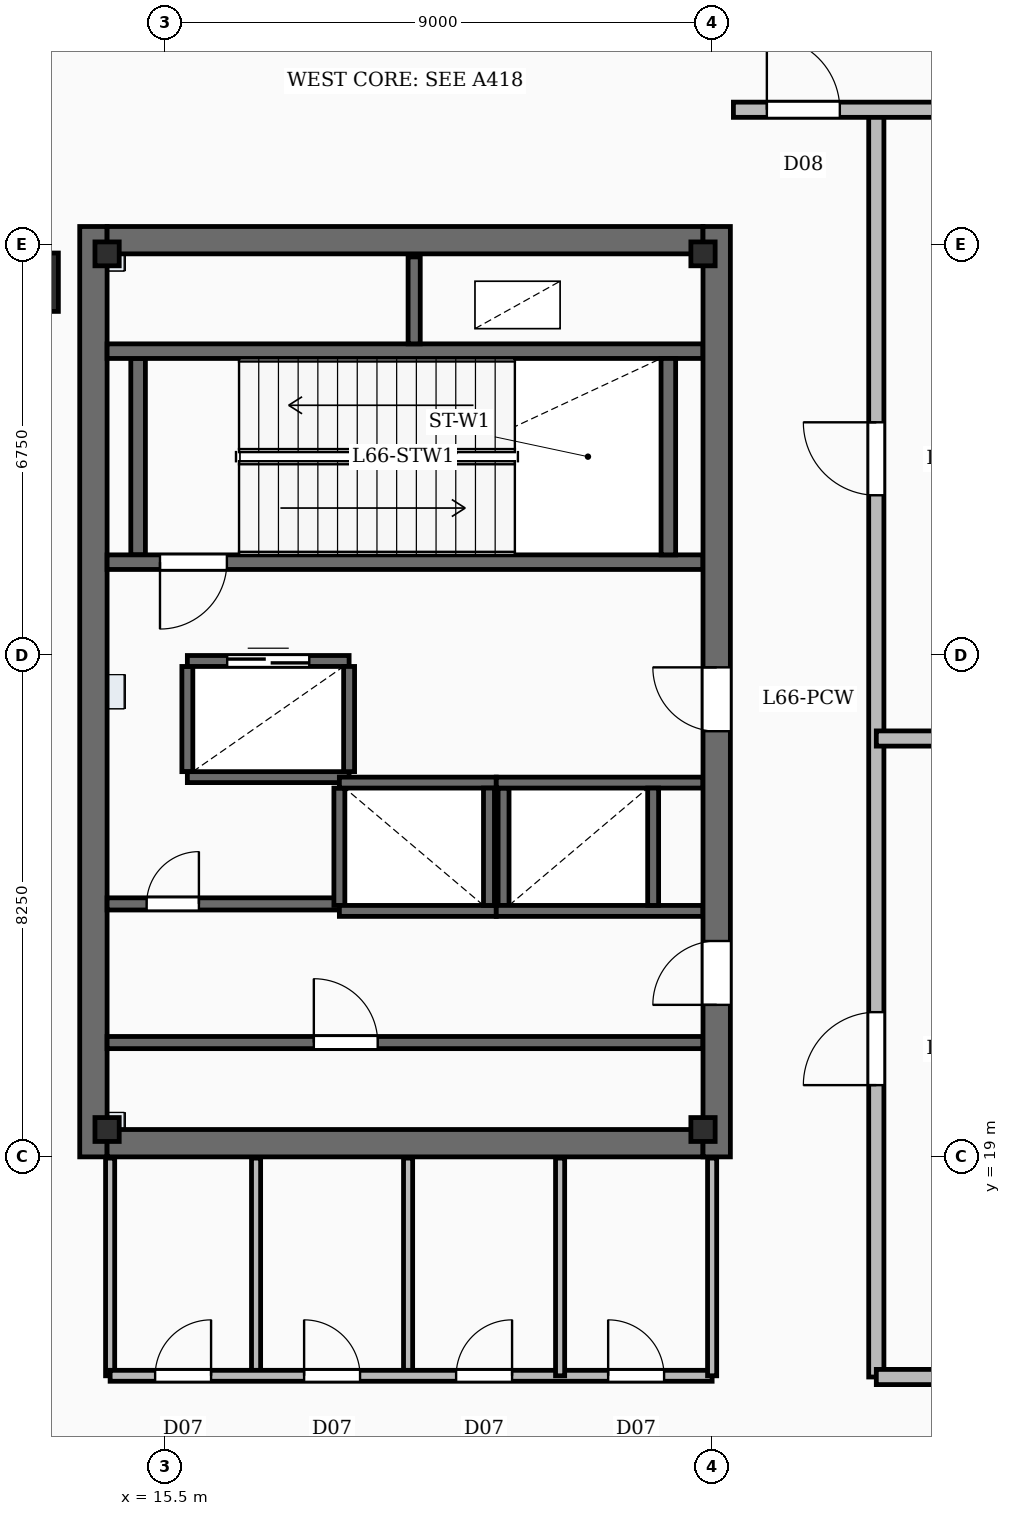
"""IFC4 building model, lengths in metres.
Left out: names, types, materials, properties, quantities, classifications, styles, units other than length and angle.
Written with IfcOpenShell. Run it as: python <this file> out.ifc"""

import sys

from ifc_helpers import new_model, si_unit, direction, frame, frame_2d, origin, origin_2d, place, context, subcontext, project, spatial, rectangle, i_section, extrude, element, fill, save


model = new_model("IFC4")
c1 = context("Model", 3, precision=1e-05, world=origin(), true_north=direction((0.0, 1.0)))
c2 = subcontext(c1, "Body", "Model", "MODEL_VIEW")
j1 = project(units=[si_unit("LENGTHUNIT", "METRE"), si_unit("PLANEANGLEUNIT", "RADIAN")], contexts=[c1])
p1 = place(None, origin())
s1 = spatial("IfcSite", under=j1, at=p1, CompositionType="ELEMENT")
p2 = place(p1, origin())
s2 = spatial("IfcBuilding", under=s1, at=p2, CompositionType="ELEMENT")
p3 = place(p2, frame((0.0, 0.0, 269.7)))
s3 = spatial("IfcBuildingStorey", under=s2, at=p3, CompositionType="ELEMENT", Elevation=269.7)
p4 = place(p3, frame((14.325, 19.0, -0.42), z_axis=(0.0, 0.0, 1.0), x_axis=(0.0, 1.0, 0.0)))
e1 = element("IfcWall", 1, at=p4, inside=s3, PredefinedType="SHEAR", context=c2, shape_type="SweptSolid", body=[
    extrude(rectangle(XDim=15.3, YDim=0.45, at=frame_2d((7.65, 0.0))), origin(), (0.0, 0.0, 1.0), 5.17),
])
p5 = place(p3, frame((24.575, 19.0, -0.42), z_axis=(0.0, 0.0, 1.0), x_axis=(0.0, 1.0, 0.0)))
e2 = element("IfcWall", 2, at=p5, inside=s3, PredefinedType="SHEAR", context=c2, shape_type="SweptSolid", body=[
    extrude(rectangle(XDim=15.3, YDim=0.45, at=frame_2d((7.65, 0.0))), origin(), (0.0, 0.0, 1.0), 5.17),
])
p6 = place(p5, frame((2.5, 0.0, 0.42)))
e3 = element("IfcOpeningElement", 3, at=p6, cuts=e2, PredefinedType="OPENING", context=c2, shape_type="SweptSolid", body=[
    extrude(rectangle(XDim=1.05, YDim=2.15, at=frame_2d((0.525, 1.075))), frame((0.0, 0.235, 0.0), z_axis=(0.0, -1.0, 0.0), x_axis=(1.0, 0.0, 0.0)), (0.0, 0.0, 1.0), 0.47),
])
p7 = place(p5, frame((7.0, 0.0, 0.42)))
e4 = element("IfcOpeningElement", 4, at=p7, cuts=e2, PredefinedType="OPENING", context=c2, shape_type="SweptSolid", body=[
    extrude(rectangle(XDim=1.05, YDim=2.15, at=frame_2d((0.525, 1.075))), frame((0.0, 0.235, 0.0), z_axis=(0.0, -1.0, 0.0), x_axis=(1.0, 0.0, 0.0)), (0.0, 0.0, 1.0), 0.47),
])
for number, where, z_axis, x_axis in (
    (5, (14.55, 19.225, -0.42), (0.0, 0.0, 1.0), (1.0, 0.0, 0.0)),
    (6, (14.55, 34.075, -0.42), (0.0, 0.0, 1.0), (1.0, 0.0, 0.0)),
):
    element("IfcWall", number, at=place(p3, frame(where, z_axis=z_axis, x_axis=x_axis)), inside=s3, PredefinedType="SHEAR", context=c2, shape_type="SweptSolid", body=[
        extrude(rectangle(XDim=9.8, YDim=0.45, at=frame_2d((4.9, 0.0))), origin(), (0.0, 0.0, 1.0), 5.17),
    ])
for number, where, z_axis, x_axis in (
    (7, (14.55, 19.45, -0.42), (0.0, 0.0, 1.0), (1.0, 0.0, 0.0)),
    (8, (24.35, 19.45, -0.42), (0.0, 0.0, 1.0), (1.0, 0.0, 0.0)),
    (9, (14.55, 33.85, -0.42), (0.0, 0.0, 1.0), (1.0, 0.0, 0.0)),
    (10, (24.35, 33.85, -0.42), (0.0, 0.0, 1.0), (1.0, 0.0, 0.0)),
):
    element("IfcColumn", number, at=place(p3, frame(where, z_axis=z_axis, x_axis=x_axis)), inside=s3, PredefinedType="COLUMN", context=c2, shape_type="SweptSolid", body=[
        extrude(i_section(OverallWidth=0.399, OverallDepth=0.393, WebThickness=0.023, FlangeThickness=0.037, FilletRadius=0.02, at=origin_2d()), origin(), (0.0, 0.0, 1.0), 5.17),
    ])
p8 = place(p3, frame((10.241, 10.697, 0.0), z_axis=(0.0, 0.0, 1.0), x_axis=(0.113196122102, 0.993572663644, 0.0)))
e11 = element("IfcWall", 11, at=p8, inside=s3, PredefinedType="SOLIDWALL", context=c2, shape_type="SweptSolid", body=[
    extrude(rectangle(XDim=34.5, YDim=0.42, at=frame_2d((17.25, 0.0))), origin(), (0.0, 0.0, 1.0), 4.75),
])
p9 = place(p3, frame((24.35, 28.78, 0.0), z_axis=(0.0, 0.0, 1.0), x_axis=(-1.0, 0.0, 0.0)))
e12 = element("IfcWall", 12, at=p9, inside=s3, PredefinedType="SOLIDWALL", context=c2, shape_type="SweptSolid", body=[
    extrude(rectangle(XDim=9.8, YDim=0.24, at=frame_2d((4.9, 0.0))), origin(), (0.0, 0.0, 1.0), 4.75),
])
p10 = place(p9, frame((7.83, 0.0, 0.0)))
e13 = element("IfcOpeningElement", 13, at=p10, cuts=e12, PredefinedType="OPENING", context=c2, shape_type="SweptSolid", body=[
    extrude(rectangle(XDim=1.1, YDim=2.15, at=frame_2d((0.55, 1.075))), frame((0.0, 0.13, 0.0), z_axis=(0.0, -1.0, 0.0), x_axis=(1.0, 0.0, 0.0)), (0.0, 0.0, 1.0), 0.26),
])
p11 = place(p3, frame((14.55, 32.25, 0.0), z_axis=(0.0, 0.0, 1.0), x_axis=(1.0, 0.0, 0.0)))
e14 = element("IfcWall", 14, at=p11, inside=s3, PredefinedType="SOLIDWALL", context=c2, shape_type="SweptSolid", body=[
    extrude(rectangle(XDim=9.8, YDim=0.24, at=frame_2d((4.9, 0.0))), origin(), (0.0, 0.0, 1.0), 4.75),
])
for number, where, z_axis, x_axis in (
    (15, (15.06, 28.9, 0.0), (0.0, 0.0, 1.0), (0.0, 1.0, 0.0)),
    (16, (23.78, 28.9, 0.0), (0.0, 0.0, 1.0), (0.0, 1.0, 0.0)),
):
    element("IfcWall", number, at=place(p3, frame(where, z_axis=z_axis, x_axis=x_axis)), inside=s3, PredefinedType="SOLIDWALL", context=c2, shape_type="SweptSolid", body=[
        extrude(rectangle(XDim=3.23, YDim=0.24, at=frame_2d((1.615, 0.0))), origin(), (0.0, 0.0, 1.0), 4.75),
    ])
p12 = place(p3, frame((19.6, 32.37, 0.0), z_axis=(0.0, 0.0, 1.0), x_axis=(0.0, 1.0, 0.0)))
e17 = element("IfcWall", 17, at=p12, inside=s3, PredefinedType="SOLIDWALL", context=c2, shape_type="SweptSolid", body=[
    extrude(rectangle(XDim=1.43, YDim=0.2, at=frame_2d((0.715, 0.0))), origin(), (0.0, 0.0, 1.0), 4.75),
])
for number, where, z_axis, x_axis in (
    (18, (18.37, 25.155, 0.0), (0.0, 0.0, 1.0), (1.0, 0.0, 0.0)),
    (19, (18.37, 23.045, 0.0), (0.0, 0.0, 1.0), (1.0, 0.0, 0.0)),
):
    element("IfcWall", number, at=place(p3, frame(where, z_axis=z_axis, x_axis=x_axis)), inside=s3, PredefinedType="SOLIDWALL", context=c2, shape_type="SweptSolid", body=[
        extrude(rectangle(XDim=2.58, YDim=0.18, at=frame_2d((1.29, 0.0))), origin(), (0.0, 0.0, 1.0), 4.75),
    ])
for number, where, z_axis, x_axis in (
    (20, (18.37, 23.135, 0.0), (0.0, 0.0, 1.0), (0.0, 1.0, 0.0)),
    (21, (20.83, 23.135, 0.0), (0.0, 0.0, 1.0), (0.0, 1.0, 0.0)),
):
    element("IfcWall", number, at=place(p3, frame(where, z_axis=z_axis, x_axis=x_axis)), inside=s3, PredefinedType="SOLIDWALL", context=c2, shape_type="SweptSolid", body=[
        extrude(rectangle(XDim=1.93, YDim=0.18, at=frame_2d((0.965, 0.0))), origin(), (0.0, 0.0, 1.0), 4.75),
    ])
for number, where, z_axis, x_axis in (
    (22, (20.95, 25.155, 0.0), (0.0, 0.0, 1.0), (1.0, 0.0, 0.0)),
    (23, (20.95, 23.045, 0.0), (0.0, 0.0, 1.0), (1.0, 0.0, 0.0)),
):
    element("IfcWall", number, at=place(p3, frame(where, z_axis=z_axis, x_axis=x_axis)), inside=s3, PredefinedType="SOLIDWALL", context=c2, shape_type="SweptSolid", body=[
        extrude(rectangle(XDim=3.4, YDim=0.18, at=frame_2d((1.7, 0.0))), origin(), (0.0, 0.0, 1.0), 4.75),
    ])
for number, where, z_axis, x_axis in (
    (24, (21.07, 23.135, 0.0), (0.0, 0.0, 1.0), (0.0, 1.0, 0.0)),
    (25, (23.53, 23.135, 0.0), (0.0, 0.0, 1.0), (0.0, 1.0, 0.0)),
):
    element("IfcWall", number, at=place(p3, frame(where, z_axis=z_axis, x_axis=x_axis)), inside=s3, PredefinedType="SOLIDWALL", context=c2, shape_type="SweptSolid", body=[
        extrude(rectangle(XDim=1.93, YDim=0.18, at=frame_2d((0.965, 0.0))), origin(), (0.0, 0.0, 1.0), 4.75),
    ])
p13 = place(p3, frame((15.87, 27.155, 0.0), z_axis=(0.0, 0.0, 1.0), x_axis=(1.0, 0.0, 0.0)))
e26 = element("IfcWall", 26, at=p13, inside=s3, PredefinedType="SOLIDWALL", context=c2, shape_type="SweptSolid", body=[
    extrude(rectangle(XDim=2.66, YDim=0.18, at=frame_2d((1.33, 0.0))), origin(), (0.0, 0.0, 1.0), 4.75),
])
p14 = place(p13, frame((0.655, 0.0, 0.0)))
e27 = element("IfcOpeningElement", 27, at=p14, cuts=e26, PredefinedType="OPENING", context=c2, shape_type="SweptSolid", body=[
    extrude(rectangle(XDim=1.35, YDim=2.3, at=frame_2d((0.675, 1.15))), frame((0.0, 0.1, 0.0), z_axis=(0.0, -1.0, 0.0), x_axis=(1.0, 0.0, 0.0)), (0.0, 0.0, 1.0), 0.2),
])
p15 = place(p3, frame((15.87, 25.245, 0.0), z_axis=(0.0, 0.0, 1.0), x_axis=(1.0, 0.0, 0.0)))
e28 = element("IfcWall", 28, at=p15, inside=s3, PredefinedType="SOLIDWALL", context=c2, shape_type="SweptSolid", body=[
    extrude(rectangle(XDim=2.66, YDim=0.18, at=frame_2d((1.33, 0.0))), origin(), (0.0, 0.0, 1.0), 4.75),
])
for number, where, z_axis, x_axis in (
    (29, (15.87, 25.335, 0.0), (0.0, 0.0, 1.0), (0.0, 1.0, 0.0)),
    (30, (18.53, 25.335, 0.0), (0.0, 0.0, 1.0), (0.0, 1.0, 0.0)),
):
    element("IfcWall", number, at=place(p3, frame(where, z_axis=z_axis, x_axis=x_axis)), inside=s3, PredefinedType="SOLIDWALL", context=c2, shape_type="SweptSolid", body=[
        extrude(rectangle(XDim=1.73, YDim=0.18, at=frame_2d((0.865, 0.0))), origin(), (0.0, 0.0, 1.0), 4.75),
    ])
p16 = place(p3, frame((14.55, 20.88, 0.0), z_axis=(0.0, 0.0, 1.0), x_axis=(1.0, 0.0, 0.0)))
e31 = element("IfcWall", 31, at=p16, inside=s3, PredefinedType="SOLIDWALL", context=c2, shape_type="SweptSolid", body=[
    extrude(rectangle(XDim=9.8, YDim=0.2, at=frame_2d((4.9, 0.0))), origin(), (0.0, 0.0, 1.0), 3.81),
])
p17 = place(p16, frame((3.4, 0.0, 0.0)))
e32 = element("IfcOpeningElement", 32, at=p17, cuts=e31, PredefinedType="OPENING", context=c2, shape_type="SweptSolid", body=[
    extrude(rectangle(XDim=1.05, YDim=2.15, at=frame_2d((0.525, 1.075))), frame((0.0, 0.11, 0.0), z_axis=(0.0, -1.0, 0.0), x_axis=(1.0, 0.0, 0.0)), (0.0, 0.0, 1.0), 0.22),
])
p18 = place(p3, frame((14.55, 23.16, 0.0), z_axis=(0.0, 0.0, 1.0), x_axis=(1.0, 0.0, 0.0)))
e33 = element("IfcWall", 33, at=p18, inside=s3, PredefinedType="SOLIDWALL", context=c2, shape_type="SweptSolid", body=[
    extrude(rectangle(XDim=3.82, YDim=0.2, at=frame_2d((1.91, 0.0))), origin(), (0.0, 0.0, 1.0), 3.81),
])
p19 = place(p18, frame((0.65, 0.0, 0.0)))
e34 = element("IfcOpeningElement", 34, at=p19, cuts=e33, PredefinedType="OPENING", context=c2, shape_type="SweptSolid", body=[
    extrude(rectangle(XDim=0.86, YDim=2.05, at=frame_2d((0.43, 1.025))), frame((0.0, 0.11, 0.0), z_axis=(0.0, -1.0, 0.0), x_axis=(1.0, 0.0, 0.0)), (0.0, 0.0, 1.0), 0.22),
])
for number, where, z_axis, x_axis in (
    (35, (17.0, 15.4, 0.0), (0.0, 0.0, 1.0), (0.0, 1.0, 0.0)),
    (36, (19.5, 15.4, 0.0), (0.0, 0.0, 1.0), (0.0, 1.0, 0.0)),
    (37, (22.0, 15.4, 0.0), (0.0, 0.0, 1.0), (0.0, 1.0, 0.0)),
):
    element("IfcWall", number, at=place(p3, frame(where, z_axis=z_axis, x_axis=x_axis)), inside=s3, PredefinedType="PARTITIONING", context=c2, shape_type="SweptSolid", body=[
        extrude(rectangle(XDim=3.58, YDim=0.15, at=frame_2d((1.79, 0.0))), origin(), (0.0, 0.0, 1.0), 3.81),
    ])
p20 = place(p3, frame((14.6, 15.4, 0.0), z_axis=(0.0, 0.0, 1.0), x_axis=(1.0, 0.0, 0.0)))
e38 = element("IfcWall", 38, at=p20, inside=s3, PredefinedType="PARTITIONING", context=c2, shape_type="SweptSolid", body=[
    extrude(rectangle(XDim=9.9, YDim=0.18, at=frame_2d((4.95, 0.0))), origin(), (0.0, 0.0, 1.0), 3.81),
])
p21 = place(p20, frame((0.74, 0.0, 0.0)))
e39 = element("IfcOpeningElement", 39, at=p21, cuts=e38, PredefinedType="OPENING", context=c2, shape_type="SweptSolid", body=[
    extrude(rectangle(XDim=0.92, YDim=2.1, at=frame_2d((0.46, 1.05))), frame((0.0, 0.1, 0.0), z_axis=(0.0, -1.0, 0.0), x_axis=(1.0, 0.0, 0.0)), (0.0, 0.0, 1.0), 0.2),
])
p22 = place(p20, frame((3.19, 0.0, 0.0)))
e40 = element("IfcOpeningElement", 40, at=p22, cuts=e38, PredefinedType="OPENING", context=c2, shape_type="SweptSolid", body=[
    extrude(rectangle(XDim=0.92, YDim=2.1, at=frame_2d((0.46, 1.05))), frame((0.0, 0.1, 0.0), z_axis=(0.0, -1.0, 0.0), x_axis=(1.0, 0.0, 0.0)), (0.0, 0.0, 1.0), 0.2),
])
p23 = place(p20, frame((5.69, 0.0, 0.0)))
e41 = element("IfcOpeningElement", 41, at=p23, cuts=e38, PredefinedType="OPENING", context=c2, shape_type="SweptSolid", body=[
    extrude(rectangle(XDim=0.92, YDim=2.1, at=frame_2d((0.46, 1.05))), frame((0.0, 0.1, 0.0), z_axis=(0.0, -1.0, 0.0), x_axis=(1.0, 0.0, 0.0)), (0.0, 0.0, 1.0), 0.2),
])
p24 = place(p20, frame((8.19, 0.0, 0.0)))
e42 = element("IfcOpeningElement", 42, at=p24, cuts=e38, PredefinedType="OPENING", context=c2, shape_type="SweptSolid", body=[
    extrude(rectangle(XDim=0.92, YDim=2.1, at=frame_2d((0.46, 1.05))), frame((0.0, 0.1, 0.0), z_axis=(0.0, -1.0, 0.0), x_axis=(1.0, 0.0, 0.0)), (0.0, 0.0, 1.0), 0.2),
])
for number, where, z_axis, x_axis in (
    (43, (14.6, 15.4, 0.0), (0.0, 0.0, 1.0), (0.0, 1.0, 0.0)),
    (44, (24.5, 15.4, 0.0), (0.0, 0.0, 1.0), (0.0, 1.0, 0.0)),
):
    element("IfcWall", number, at=place(p3, frame(where, z_axis=z_axis, x_axis=x_axis)), inside=s3, PredefinedType="PARTITIONING", context=c2, shape_type="SweptSolid", body=[
        extrude(rectangle(XDim=3.58, YDim=0.15, at=frame_2d((1.79, 0.0))), origin(), (0.0, 0.0, 1.0), 2.8),
    ])
for number, where, z_axis, x_axis in (
    (45, (27.2, 25.88, 0.0), (0.0, 0.0, 1.0), (1.0, 0.0, 0.0)),
    (46, (27.2, 15.38, 0.0), (0.0, 0.0, 1.0), (1.0, 0.0, 0.0)),
):
    element("IfcWall", number, at=place(p3, frame(where, z_axis=z_axis, x_axis=x_axis)), inside=s3, PredefinedType="SOLIDWALL", context=c2, shape_type="SweptSolid", body=[
        extrude(rectangle(XDim=20.5, YDim=0.25, at=frame_2d((10.25, 0.0))), origin(), (0.0, 0.0, 1.0), 3.81),
    ])
p25 = place(p3, frame((24.85, 36.22, 0.0), z_axis=(0.0, 0.0, 1.0), x_axis=(1.0, 0.0, 0.0)))
e47 = element("IfcWall", 47, at=p25, inside=s3, PredefinedType="SOLIDWALL", context=c2, shape_type="SweptSolid", body=[
    extrude(rectangle(XDim=25.2, YDim=0.25, at=frame_2d((12.6, 0.0))), origin(), (0.0, 0.0, 1.0), 3.81),
])
p26 = place(p25, frame((0.55, 0.0, 0.0)))
e48 = element("IfcOpeningElement", 48, at=p26, cuts=e47, PredefinedType="OPENING", context=c2, shape_type="SweptSolid", body=[
    extrude(rectangle(XDim=1.2, YDim=2.2, at=frame_2d((0.6, 1.1))), frame((0.0, 0.135, 0.0), z_axis=(0.0, -1.0, 0.0), x_axis=(1.0, 0.0, 0.0)), (0.0, 0.0, 1.0), 0.27),
])
p27 = place(p3, frame((27.2, 15.38, 0.0), z_axis=(0.0, 0.0, 1.0), x_axis=(0.0, 1.0, 0.0)))
e49 = element("IfcWall", 49, at=p27, inside=s3, PredefinedType="SOLIDWALL", context=c2, shape_type="SweptSolid", body=[
    extrude(rectangle(XDim=20.84, YDim=0.25, at=frame_2d((10.42, 0.0))), origin(), (0.0, 0.0, 1.0), 3.81),
])
p28 = place(p27, frame((4.8, 0.0, 0.0)))
e50 = element("IfcOpeningElement", 50, at=p28, cuts=e49, PredefinedType="OPENING", context=c2, shape_type="SweptSolid", body=[
    extrude(rectangle(XDim=1.2, YDim=2.2, at=frame_2d((0.6, 1.1))), frame((0.0, 0.135, 0.0), z_axis=(0.0, -1.0, 0.0), x_axis=(1.0, 0.0, 0.0)), (0.0, 0.0, 1.0), 0.27),
])
p29 = place(p27, frame((14.5, 0.0, 0.0)))
e51 = element("IfcOpeningElement", 51, at=p29, cuts=e49, PredefinedType="OPENING", context=c2, shape_type="SweptSolid", body=[
    extrude(rectangle(XDim=1.2, YDim=2.2, at=frame_2d((0.6, 1.1))), frame((0.0, 0.135, 0.0), z_axis=(0.0, -1.0, 0.0), x_axis=(1.0, 0.0, 0.0)), (0.0, 0.0, 1.0), 0.27),
])
p30 = place(p6, origin())
e52 = element("IfcDoor", 52, at=p30, inside=s3, OperationType="SINGLE_SWING_LEFT", PredefinedType="DOOR", context=c2, shape_type="SweptSolid", body=[
    extrude(rectangle(XDim=1.05, YDim=2.15, at=frame_2d((0.525, 1.075))), frame((0.0, 0.025, 0.0), z_axis=(0.0, -1.0, 0.0), x_axis=(1.0, 0.0, 0.0)), (0.0, 0.0, 1.0), 0.05),
])
fill(e3, e52)
p31 = place(p7, origin())
e53 = element("IfcDoor", 53, at=p31, inside=s3, OperationType="SINGLE_SWING_RIGHT", PredefinedType="DOOR", context=c2, shape_type="SweptSolid", body=[
    extrude(rectangle(XDim=1.05, YDim=2.15, at=frame_2d((0.525, 1.075))), frame((0.0, 0.025, 0.0), z_axis=(0.0, -1.0, 0.0), x_axis=(1.0, 0.0, 0.0)), (0.0, 0.0, 1.0), 0.05),
])
fill(e4, e53)
p32 = place(p10, origin())
e54 = element("IfcDoor", 54, at=p32, inside=s3, OperationType="SINGLE_SWING_RIGHT", PredefinedType="DOOR", context=c2, shape_type="SweptSolid", body=[
    extrude(rectangle(XDim=1.1, YDim=2.15, at=frame_2d((0.55, 1.075))), frame((0.0, 0.025, 0.0), z_axis=(0.0, -1.0, 0.0), x_axis=(1.0, 0.0, 0.0)), (0.0, 0.0, 1.0), 0.05),
])
fill(e13, e54)
p33 = place(p14, origin())
e55 = element("IfcDoor", 55, at=p33, inside=s3, OperationType="DOUBLE_DOOR_SLIDING", PredefinedType="DOOR", context=c2, shape_type="SweptSolid", body=[
    extrude(rectangle(XDim=1.35, YDim=2.3, at=frame_2d((0.675, 1.15))), frame((0.0, 0.025, 0.0), z_axis=(0.0, -1.0, 0.0), x_axis=(1.0, 0.0, 0.0)), (0.0, 0.0, 1.0), 0.05),
])
fill(e27, e55)
p34 = place(p17, origin())
e56 = element("IfcDoor", 56, at=p34, inside=s3, OperationType="SINGLE_SWING_LEFT", PredefinedType="DOOR", context=c2, shape_type="SweptSolid", body=[
    extrude(rectangle(XDim=1.05, YDim=2.15, at=frame_2d((0.525, 1.075))), frame((0.0, 0.025, 0.0), z_axis=(0.0, -1.0, 0.0), x_axis=(1.0, 0.0, 0.0)), (0.0, 0.0, 1.0), 0.05),
])
fill(e32, e56)
p35 = place(p19, origin())
e57 = element("IfcDoor", 57, at=p35, inside=s3, OperationType="SINGLE_SWING_RIGHT", PredefinedType="DOOR", context=c2, shape_type="SweptSolid", body=[
    extrude(rectangle(XDim=0.86, YDim=2.05, at=frame_2d((0.43, 1.025))), frame((0.0, 0.025, 0.0), z_axis=(0.0, -1.0, 0.0), x_axis=(1.0, 0.0, 0.0)), (0.0, 0.0, 1.0), 0.05),
])
fill(e34, e57)
p36 = place(p21, origin())
e58 = element("IfcDoor", 58, at=p36, inside=s3, OperationType="SINGLE_SWING_RIGHT", PredefinedType="DOOR", context=c2, shape_type="SweptSolid", body=[
    extrude(rectangle(XDim=0.92, YDim=2.1, at=frame_2d((0.46, 1.05))), frame((0.0, 0.025, 0.0), z_axis=(0.0, -1.0, 0.0), x_axis=(1.0, 0.0, 0.0)), (0.0, 0.0, 1.0), 0.05),
])
fill(e39, e58)
p37 = place(p22, origin())
e59 = element("IfcDoor", 59, at=p37, inside=s3, OperationType="SINGLE_SWING_LEFT", PredefinedType="DOOR", context=c2, shape_type="SweptSolid", body=[
    extrude(rectangle(XDim=0.92, YDim=2.1, at=frame_2d((0.46, 1.05))), frame((0.0, 0.025, 0.0), z_axis=(0.0, -1.0, 0.0), x_axis=(1.0, 0.0, 0.0)), (0.0, 0.0, 1.0), 0.05),
])
fill(e40, e59)
p38 = place(p23, origin())
e60 = element("IfcDoor", 60, at=p38, inside=s3, OperationType="SINGLE_SWING_RIGHT", PredefinedType="DOOR", context=c2, shape_type="SweptSolid", body=[
    extrude(rectangle(XDim=0.92, YDim=2.1, at=frame_2d((0.46, 1.05))), frame((0.0, 0.025, 0.0), z_axis=(0.0, -1.0, 0.0), x_axis=(1.0, 0.0, 0.0)), (0.0, 0.0, 1.0), 0.05),
])
fill(e41, e60)
p39 = place(p24, origin())
e61 = element("IfcDoor", 61, at=p39, inside=s3, OperationType="SINGLE_SWING_LEFT", PredefinedType="DOOR", context=c2, shape_type="SweptSolid", body=[
    extrude(rectangle(XDim=0.92, YDim=2.1, at=frame_2d((0.46, 1.05))), frame((0.0, 0.025, 0.0), z_axis=(0.0, -1.0, 0.0), x_axis=(1.0, 0.0, 0.0)), (0.0, 0.0, 1.0), 0.05),
])
fill(e42, e61)
p40 = place(p26, origin())
e62 = element("IfcDoor", 62, at=p40, inside=s3, OperationType="SINGLE_SWING_LEFT", PredefinedType="DOOR", context=c2, shape_type="SweptSolid", body=[
    extrude(rectangle(XDim=1.2, YDim=2.2, at=frame_2d((0.6, 1.1))), frame((0.0, 0.025, 0.0), z_axis=(0.0, -1.0, 0.0), x_axis=(1.0, 0.0, 0.0)), (0.0, 0.0, 1.0), 0.05),
])
fill(e48, e62)
p41 = place(p28, origin())
e63 = element("IfcDoor", 63, at=p41, inside=s3, OperationType="SINGLE_SWING_LEFT", PredefinedType="DOOR", context=c2, shape_type="SweptSolid", body=[
    extrude(rectangle(XDim=1.2, YDim=2.2, at=frame_2d((0.6, 1.1))), frame((0.0, 0.025, 0.0), z_axis=(0.0, -1.0, 0.0), x_axis=(1.0, 0.0, 0.0)), (0.0, 0.0, 1.0), 0.05),
])
fill(e50, e63)
p42 = place(p29, origin())
e64 = element("IfcDoor", 64, at=p42, inside=s3, OperationType="SINGLE_SWING_RIGHT", PredefinedType="DOOR", context=c2, shape_type="SweptSolid", body=[
    extrude(rectangle(XDim=1.2, YDim=2.2, at=frame_2d((0.6, 1.1))), frame((0.0, 0.025, 0.0), z_axis=(0.0, -1.0, 0.0), x_axis=(1.0, 0.0, 0.0)), (0.0, 0.0, 1.0), 0.05),
])
fill(e51, e64)
save(model, sys.argv[1])
